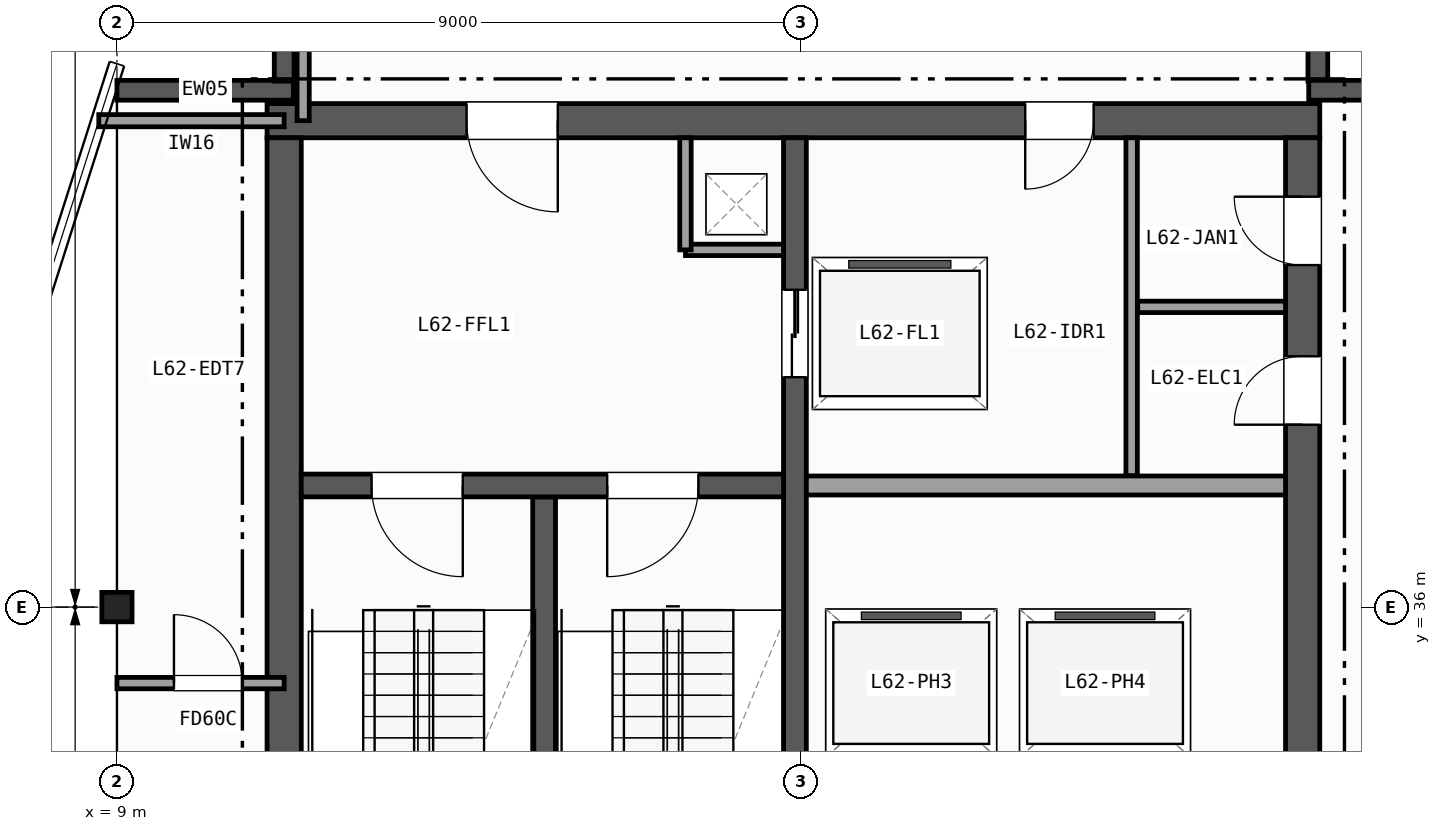
"""IFC4 building model, lengths in metres.
Left out: names, types, materials, properties, quantities, classifications, styles, units other than length and angle.
Written with IfcOpenShell. Run it as: python <this file> out.ifc"""

import sys

from ifc_helpers import new_model, si_unit, direction, frame, frame_2d, origin, origin_2d, place, context, subcontext, project, spatial, rectangle, i_section, extrude, element, fill, save


model = new_model("IFC4")
c1 = context("Model", 3, precision=1e-05, world=origin(), true_north=direction((0.0, 1.0)))
c2 = subcontext(c1, "Body", "Model", "MODEL_VIEW")
j1 = project(units=[si_unit("LENGTHUNIT", "METRE"), si_unit("PLANEANGLEUNIT", "RADIAN")], contexts=[c1])
p1 = place(None, origin())
s1 = spatial("IfcSite", under=j1, at=p1, CompositionType="ELEMENT")
p2 = place(p1, origin())
s2 = spatial("IfcBuilding", under=s1, at=p2, CompositionType="ELEMENT")
p3 = place(p2, frame((0.0, 0.0, 248.2)))
s3 = spatial("IfcBuildingStorey", under=s2, at=p3, CompositionType="ELEMENT", Elevation=248.2)
p4 = place(p3, frame((9.0, 36.0, 0.0), z_axis=(0.0, 0.0, 1.0), x_axis=(1.0, 0.0, 0.0)))
e1 = element("IfcColumn", 1, at=p4, inside=s3, PredefinedType="COLUMN", context=c2, shape_type="SweptSolid", body=[
    extrude(i_section(OverallWidth=0.397, OverallDepth=0.387, WebThickness=0.021, FlangeThickness=0.033, FilletRadius=0.015, at=origin_2d()), origin(), (0.0, 0.0, 1.0), 3.7),
])
p5 = place(p3, frame((9.0, 42.8, 0.0), z_axis=(0.0, 0.0, 1.0), x_axis=(1.0, 0.0, 0.0)))
e2 = element("IfcWall", 2, at=p5, inside=s3, PredefinedType="SOLIDWALL", context=c2, shape_type="SweptSolid", body=[
    extrude(rectangle(XDim=2.32, YDim=0.26, at=frame_2d((1.16, 0.0))), origin(), (0.0, 0.0, 1.0), 3.42),
])
for number, where, z_axis, x_axis in (
    (3, (11.2, 42.92, 0.0), (0.0, 0.0, 1.0), (0.0, 1.0, 0.0)),
    (4, (24.8, 45.0, 0.0), (0.0, 0.0, 1.0), (0.0, -1.0, 0.0)),
):
    element("IfcWall", number, at=place(p3, frame(where, z_axis=z_axis, x_axis=x_axis)), inside=s3, PredefinedType="SOLIDWALL", context=c2, shape_type="SweptSolid", body=[
        extrude(rectangle(XDim=2.08, YDim=0.26, at=frame_2d((1.04, 0.0))), origin(), (0.0, 0.0, 1.0), 3.42),
    ])
p6 = place(p3, frame((24.68, 42.8, 0.0), z_axis=(0.0, 0.0, 1.0), x_axis=(1.0, 0.0, 0.0)))
e5 = element("IfcWall", 5, at=p6, inside=s3, PredefinedType="SOLIDWALL", context=c2, shape_type="SweptSolid", body=[
    extrude(rectangle(XDim=2.32, YDim=0.26, at=frame_2d((1.16, 0.0))), origin(), (0.0, 0.0, 1.0), 3.42),
])
p7 = place(p3, frame((24.825, 42.4, 0.0), z_axis=(0.0, 0.0, 1.0), x_axis=(-1.0, 0.0, 0.0)))
e6 = element("IfcWall", 6, at=p7, inside=s3, PredefinedType="SHEAR", context=c2, shape_type="SweptSolid", body=[
    extrude(rectangle(XDim=13.85, YDim=0.45, at=frame_2d((6.925, 0.0))), origin(), (0.0, 0.0, 1.0), 3.42),
])
p8 = place(p7, frame((10.025, 0.0, 0.0)))
e7 = element("IfcOpeningElement", 7, at=p8, cuts=e6, PredefinedType="OPENING", context=c2, shape_type="SweptSolid", body=[
    extrude(rectangle(XDim=1.2, YDim=2.15, at=frame_2d((0.6, 1.075))), frame((0.0, 0.235, 0.0), z_axis=(0.0, -1.0, 0.0), x_axis=(1.0, 0.0, 0.0)), (0.0, 0.0, 1.0), 0.47),
])
p9 = place(p7, frame((2.975, 0.0, 0.0)))
e8 = element("IfcOpeningElement", 8, at=p9, cuts=e6, PredefinedType="OPENING", context=c2, shape_type="SweptSolid", body=[
    extrude(rectangle(XDim=0.9, YDim=2.1, at=frame_2d((0.45, 1.05))), frame((0.0, 0.235, 0.0), z_axis=(0.0, -1.0, 0.0), x_axis=(1.0, 0.0, 0.0)), (0.0, 0.0, 1.0), 0.47),
])
p10 = place(p3, frame((11.2, 42.175, 0.0), z_axis=(0.0, 0.0, 1.0), x_axis=(0.0, -1.0, 0.0)))
e9 = element("IfcWall", 9, at=p10, inside=s3, PredefinedType="SHEAR", context=c2, shape_type="SweptSolid", body=[
    extrude(rectangle(XDim=13.75, YDim=0.45, at=frame_2d((6.875, 0.0))), origin(), (0.0, 0.0, 1.0), 3.42),
])
p11 = place(p3, frame((24.6, 28.425, 0.0), z_axis=(0.0, 0.0, 1.0), x_axis=(0.0, 1.0, 0.0)))
e10 = element("IfcWall", 10, at=p11, inside=s3, PredefinedType="SHEAR", context=c2, shape_type="SweptSolid", body=[
    extrude(rectangle(XDim=13.75, YDim=0.45, at=frame_2d((6.875, 0.0))), origin(), (0.0, 0.0, 1.0), 3.42),
])
p12 = place(p11, frame((3.375, 0.0, 0.0)))
e11 = element("IfcOpeningElement", 11, at=p12, cuts=e10, PredefinedType="OPENING", context=c2, shape_type="SweptSolid", body=[
    extrude(rectangle(XDim=1.5, YDim=2.2, at=frame_2d((0.75, 1.1))), frame((0.0, 0.235, 0.0), z_axis=(0.0, -1.0, 0.0), x_axis=(1.0, 0.0, 0.0)), (0.0, 0.0, 1.0), 0.47),
])
p13 = place(p11, frame((9.975, 0.0, 0.0)))
e12 = element("IfcOpeningElement", 12, at=p13, cuts=e10, PredefinedType="OPENING", context=c2, shape_type="SweptSolid", body=[
    extrude(rectangle(XDim=0.9, YDim=2.1, at=frame_2d((0.45, 1.05))), frame((0.0, 0.235, 0.0), z_axis=(0.0, -1.0, 0.0), x_axis=(1.0, 0.0, 0.0)), (0.0, 0.0, 1.0), 0.47),
])
p14 = place(p11, frame((12.075, 0.0, 0.0)))
e13 = element("IfcOpeningElement", 13, at=p14, cuts=e10, PredefinedType="OPENING", context=c2, shape_type="SweptSolid", body=[
    extrude(rectangle(XDim=0.9, YDim=2.1, at=frame_2d((0.45, 1.05))), frame((0.0, 0.235, 0.0), z_axis=(0.0, -1.0, 0.0), x_axis=(1.0, 0.0, 0.0)), (0.0, 0.0, 1.0), 0.47),
])
p15 = place(p3, frame((14.62, 28.425, 0.0), z_axis=(0.0, 0.0, 1.0), x_axis=(0.0, 1.0, 0.0)))
e14 = element("IfcWall", 14, at=p15, inside=s3, PredefinedType="SHEAR", context=c2, shape_type="SweptSolid", body=[
    extrude(rectangle(XDim=9.025, YDim=0.3, at=frame_2d((4.512, 0.0))), origin(), (0.0, 0.0, 1.0), 3.42),
])
p16 = place(p3, frame((17.92, 42.175, 0.0), z_axis=(0.0, 0.0, 1.0), x_axis=(0.0, -1.0, 0.0)))
e15 = element("IfcWall", 15, at=p16, inside=s3, PredefinedType="SHEAR", context=c2, shape_type="SweptSolid", body=[
    extrude(rectangle(XDim=13.75, YDim=0.3, at=frame_2d((6.875, 0.0))), origin(), (0.0, 0.0, 1.0), 3.42),
])
p17 = place(p16, frame((2.0, 0.0, 0.0)))
e16 = element("IfcOpeningElement", 16, at=p17, cuts=e15, PredefinedType="OPENING", context=c2, shape_type="SweptSolid", body=[
    extrude(rectangle(XDim=1.15, YDim=2.15, at=frame_2d((0.575, 1.075))), frame((0.0, 0.16, 0.0), z_axis=(0.0, -1.0, 0.0), x_axis=(1.0, 0.0, 0.0)), (0.0, 0.0, 1.0), 0.32),
])
p18 = place(p3, frame((17.77, 37.6, 0.0), z_axis=(0.0, 0.0, 1.0), x_axis=(-1.0, 0.0, 0.0)))
e17 = element("IfcWall", 17, at=p18, inside=s3, PredefinedType="SHEAR", context=c2, shape_type="SweptSolid", body=[
    extrude(rectangle(XDim=6.345, YDim=0.3, at=frame_2d((3.172, 0.0))), origin(), (0.0, 0.0, 1.0), 3.42),
])
p19 = place(p18, frame((4.22, 0.0, 0.0)))
e18 = element("IfcOpeningElement", 18, at=p19, cuts=e17, PredefinedType="OPENING", context=c2, shape_type="SweptSolid", body=[
    extrude(rectangle(XDim=1.2, YDim=2.15, at=frame_2d((0.6, 1.075))), frame((0.0, 0.16, 0.0), z_axis=(0.0, -1.0, 0.0), x_axis=(1.0, 0.0, 0.0)), (0.0, 0.0, 1.0), 0.32),
])
p20 = place(p18, frame((1.12, 0.0, 0.0)))
e19 = element("IfcOpeningElement", 19, at=p20, cuts=e17, PredefinedType="OPENING", context=c2, shape_type="SweptSolid", body=[
    extrude(rectangle(XDim=1.2, YDim=2.15, at=frame_2d((0.6, 1.075))), frame((0.0, 0.16, 0.0), z_axis=(0.0, -1.0, 0.0), x_axis=(1.0, 0.0, 0.0)), (0.0, 0.0, 1.0), 0.32),
])
p21 = place(p3, frame((16.48, 40.7, 0.0), z_axis=(0.0, 0.0, 1.0), x_axis=(1.0, 0.0, 0.0)))
e20 = element("IfcWall", 20, at=p21, inside=s3, PredefinedType="PARTITIONING", context=c2, shape_type="SweptSolid", body=[
    extrude(rectangle(XDim=1.29, YDim=0.15, at=frame_2d((0.645, 0.0))), origin(), (0.0, 0.0, 1.0), 3.42),
])
p22 = place(p3, frame((16.48, 40.7, 0.0), z_axis=(0.0, 0.0, 1.0), x_axis=(0.0, 1.0, 0.0)))
e21 = element("IfcWall", 21, at=p22, inside=s3, PredefinedType="PARTITIONING", context=c2, shape_type="SweptSolid", body=[
    extrude(rectangle(XDim=1.475, YDim=0.15, at=frame_2d((0.738, 0.0))), origin(), (0.0, 0.0, 1.0), 3.42),
])
p23 = place(p3, frame((18.07, 37.6, 0.0), z_axis=(0.0, 0.0, 1.0), x_axis=(1.0, 0.0, 0.0)))
e22 = element("IfcWall", 22, at=p23, inside=s3, PredefinedType="PARTITIONING", context=c2, shape_type="SweptSolid", body=[
    extrude(rectangle(XDim=6.305, YDim=0.25, at=frame_2d((3.152, 0.0))), origin(), (0.0, 0.0, 1.0), 3.42),
])
p24 = place(p3, frame((22.35, 37.73, 0.0), z_axis=(0.0, 0.0, 1.0), x_axis=(0.0, 1.0, 0.0)))
e23 = element("IfcWall", 23, at=p24, inside=s3, PredefinedType="PARTITIONING", context=c2, shape_type="SweptSolid", body=[
    extrude(rectangle(XDim=4.445, YDim=0.15, at=frame_2d((2.223, 0.0))), origin(), (0.0, 0.0, 1.0), 3.42),
])
p25 = place(p3, frame((22.43, 39.95, 0.0), z_axis=(0.0, 0.0, 1.0), x_axis=(1.0, 0.0, 0.0)))
e24 = element("IfcWall", 24, at=p25, inside=s3, PredefinedType="PARTITIONING", context=c2, shape_type="SweptSolid", body=[
    extrude(rectangle(XDim=1.945, YDim=0.15, at=frame_2d((0.973, 0.0))), origin(), (0.0, 0.0, 1.0), 3.42),
])
p26 = place(p3, frame((8.761, 42.4, 0.0), z_axis=(0.0, 0.0, 1.0), x_axis=(1.0, 0.0, 0.0)))
e25 = element("IfcWall", 25, at=p26, inside=s3, PredefinedType="PARTITIONING", context=c2, shape_type="SweptSolid", body=[
    extrude(rectangle(XDim=2.439, YDim=0.16, at=frame_2d((1.219, 0.0))), origin(), (0.0, 0.0, 1.0), 3.42),
])
p27 = place(p3, frame((11.45, 42.4, 0.0), z_axis=(0.0, 0.0, 1.0), x_axis=(0.0, 1.0, 0.0)))
e26 = element("IfcWall", 26, at=p27, inside=s3, PredefinedType="PARTITIONING", context=c2, shape_type="SweptSolid", body=[
    extrude(rectangle(XDim=2.666, YDim=0.16, at=frame_2d((1.333, 0.0))), origin(), (0.0, 0.0, 1.0), 3.42),
])
p28 = place(p3, frame((9.0, 35.0, 0.0), z_axis=(0.0, 0.0, 1.0), x_axis=(1.0, 0.0, 0.0)))
e27 = element("IfcWall", 27, at=p28, inside=s3, PredefinedType="PARTITIONING", context=c2, shape_type="SweptSolid", body=[
    extrude(rectangle(XDim=2.2, YDim=0.15, at=frame_2d((1.1, 0.0))), origin(), (0.0, 0.0, 1.0), 2.707),
])
p29 = place(p28, frame((0.75, 0.0, 0.0)))
e28 = element("IfcOpeningElement", 28, at=p29, cuts=e27, PredefinedType="OPENING", context=c2, shape_type="SweptSolid", body=[
    extrude(rectangle(XDim=0.9, YDim=2.1, at=frame_2d((0.45, 1.05))), frame((0.0, 0.085, 0.0), z_axis=(0.0, -1.0, 0.0), x_axis=(1.0, 0.0, 0.0)), (0.0, 0.0, 1.0), 0.17),
])
p30 = place(p19, origin())
e29 = element("IfcDoor", 29, at=p30, inside=s3, OperationType="SINGLE_SWING_LEFT", PredefinedType="DOOR", context=c2, shape_type="SweptSolid", body=[
    extrude(rectangle(XDim=1.2, YDim=2.15, at=frame_2d((0.6, 1.075))), frame((0.0, 0.025, 0.0), z_axis=(0.0, -1.0, 0.0), x_axis=(1.0, 0.0, 0.0)), (0.0, 0.0, 1.0), 0.05),
])
fill(e18, e29)
p31 = place(p20, origin())
e30 = element("IfcDoor", 30, at=p31, inside=s3, OperationType="SINGLE_SWING_RIGHT", PredefinedType="DOOR", context=c2, shape_type="SweptSolid", body=[
    extrude(rectangle(XDim=1.2, YDim=2.15, at=frame_2d((0.6, 1.075))), frame((0.0, 0.025, 0.0), z_axis=(0.0, -1.0, 0.0), x_axis=(1.0, 0.0, 0.0)), (0.0, 0.0, 1.0), 0.05),
])
fill(e19, e30)
p32 = place(p8, origin())
e31 = element("IfcDoor", 31, at=p32, inside=s3, OperationType="SINGLE_SWING_LEFT", PredefinedType="DOOR", context=c2, shape_type="SweptSolid", body=[
    extrude(rectangle(XDim=1.2, YDim=2.15, at=frame_2d((0.6, 1.075))), frame((0.0, 0.025, 0.0), z_axis=(0.0, -1.0, 0.0), x_axis=(1.0, 0.0, 0.0)), (0.0, 0.0, 1.0), 0.05),
])
fill(e7, e31)
p33 = place(p13, origin())
e32 = element("IfcDoor", 32, at=p33, inside=s3, OperationType="SINGLE_SWING_LEFT", PredefinedType="DOOR", context=c2, shape_type="SweptSolid", body=[
    extrude(rectangle(XDim=0.9, YDim=2.1, at=frame_2d((0.45, 1.05))), frame((0.0, 0.025, 0.0), z_axis=(0.0, -1.0, 0.0), x_axis=(1.0, 0.0, 0.0)), (0.0, 0.0, 1.0), 0.05),
])
fill(e12, e32)
p34 = place(p9, origin())
e33 = element("IfcDoor", 33, at=p34, inside=s3, OperationType="SINGLE_SWING_RIGHT", PredefinedType="DOOR", context=c2, shape_type="SweptSolid", body=[
    extrude(rectangle(XDim=0.9, YDim=2.1, at=frame_2d((0.45, 1.05))), frame((0.0, 0.025, 0.0), z_axis=(0.0, -1.0, 0.0), x_axis=(1.0, 0.0, 0.0)), (0.0, 0.0, 1.0), 0.05),
])
fill(e8, e33)
p35 = place(p14, origin())
e34 = element("IfcDoor", 34, at=p35, inside=s3, OperationType="SINGLE_SWING_RIGHT", PredefinedType="DOOR", context=c2, shape_type="SweptSolid", body=[
    extrude(rectangle(XDim=0.9, YDim=2.1, at=frame_2d((0.45, 1.05))), frame((0.0, 0.025, 0.0), z_axis=(0.0, -1.0, 0.0), x_axis=(1.0, 0.0, 0.0)), (0.0, 0.0, 1.0), 0.05),
])
fill(e13, e34)
p36 = place(p17, origin())
e35 = element("IfcDoor", 35, at=p36, inside=s3, OperationType="DOUBLE_DOOR_SLIDING", PredefinedType="DOOR", context=c2, shape_type="SweptSolid", body=[
    extrude(rectangle(XDim=1.15, YDim=2.15, at=frame_2d((0.575, 1.075))), frame((0.0, 0.025, 0.0), z_axis=(0.0, -1.0, 0.0), x_axis=(1.0, 0.0, 0.0)), (0.0, 0.0, 1.0), 0.05),
])
fill(e16, e35)
p37 = place(p29, origin())
e36 = element("IfcDoor", 36, at=p37, inside=s3, OperationType="SINGLE_SWING_LEFT", PredefinedType="DOOR", context=c2, shape_type="SweptSolid", body=[
    extrude(rectangle(XDim=0.9, YDim=2.1, at=frame_2d((0.45, 1.05))), frame((0.0, 0.025, 0.0), z_axis=(0.0, -1.0, 0.0), x_axis=(1.0, 0.0, 0.0)), (0.0, 0.0, 1.0), 0.05),
])
fill(e28, e36)
save(model, sys.argv[1])
